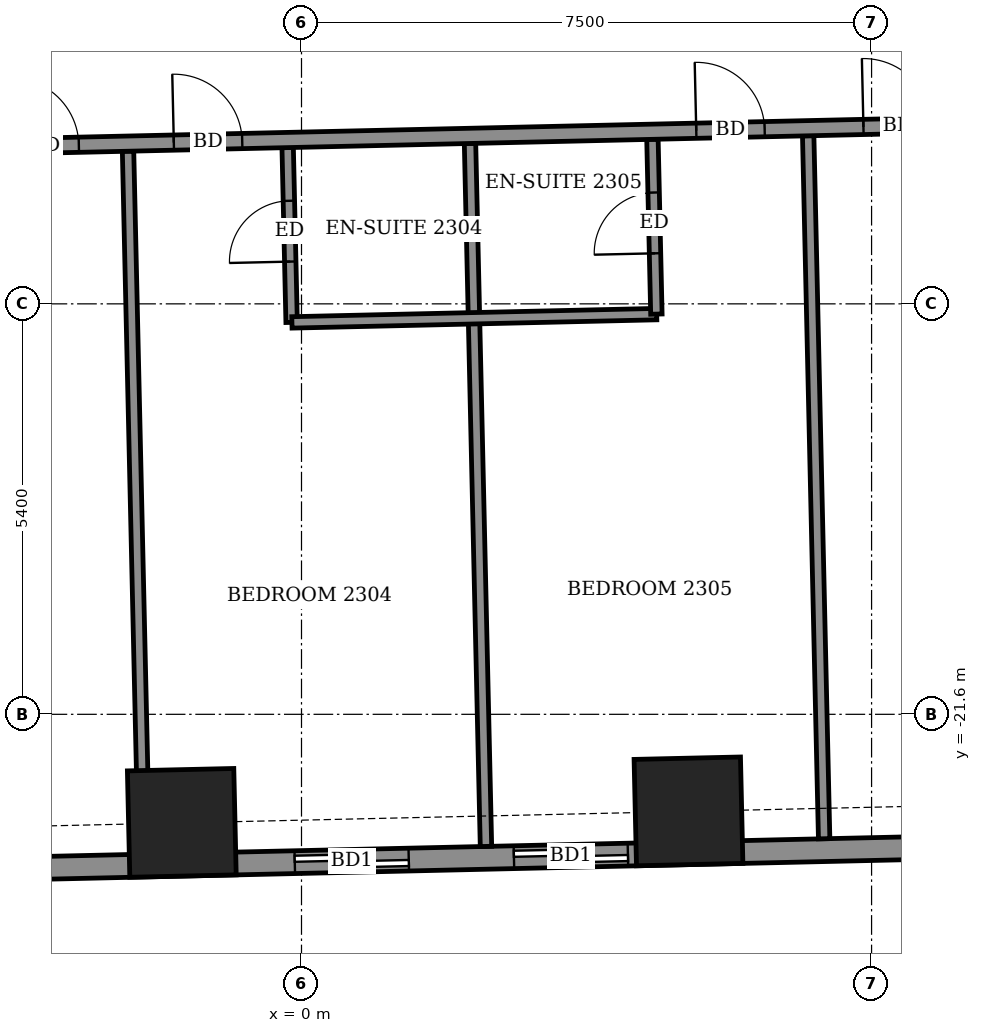
"""IFC4 building model, lengths in metres.
Left out: names, types, materials, properties, quantities, classifications, styles, units other than length and angle.
Written with IfcOpenShell. Run it as: python <this file> out.ifc"""

import sys

from ifc_helpers import new_model, si_unit, direction, frame, frame_2d, origin, origin_2d, place, context, subcontext, project, spatial, rectangle, extrude, element, fill, save


model = new_model("IFC4")
c1 = context("Model", 3, precision=1e-05, world=origin(), true_north=direction((0.0, 1.0)))
c2 = subcontext(c1, "Body", "Model", "MODEL_VIEW")
j1 = project(units=[si_unit("LENGTHUNIT", "METRE"), si_unit("PLANEANGLEUNIT", "RADIAN")], contexts=[c1])
p1 = place(None, origin())
s1 = spatial("IfcSite", under=j1, at=p1, CompositionType="ELEMENT")
p2 = place(p1, origin())
s2 = spatial("IfcBuilding", under=s1, at=p2, CompositionType="ELEMENT")
p3 = place(p2, frame((0.0, 0.0, 93.7)))
s3 = spatial("IfcBuildingStorey", under=s2, at=p3, CompositionType="ELEMENT", Elevation=93.7)
for number, where, z_axis, x_axis in (
    (1, (-1.575, -23.028, -0.55), (0.0, 0.0, 1.0), (1.0, 0.023, 0.0)),
    (2, (5.091, -22.877, -0.55), (0.0, 0.0, 1.0), (1.0, 0.023, 0.0)),
):
    element("IfcColumn", number, at=place(p3, frame(where, z_axis=z_axis, x_axis=x_axis)), inside=s3, PredefinedType="COLUMN", context=c2, shape_type="SweptSolid", body=[
        extrude(rectangle(XDim=1.4, YDim=1.4, at=origin_2d()), origin(), (0.0, 0.0, 1.0), 3.6),
    ])
p4 = place(p3, frame((-21.409, -24.029, 0.0), z_axis=(0.0, 0.0, 1.0), x_axis=(0.999742634032, 0.022686244721, 0.0)))
e3 = element("IfcWall", 3, at=p4, inside=s3, PredefinedType="SOLIDWALL", context=c2, shape_type="SweptSolid", body=[
    extrude(rectangle(XDim=46.372, YDim=0.3, at=frame_2d((23.186, 0.0))), origin(), (0.0, 0.0, 1.0), 3.05),
])
p5 = place(p4, frame((2.686, 0.0, 0.0)))
e4 = element("IfcOpeningElement", 4, at=p5, cuts=e3, PredefinedType="OPENING", context=c2, shape_type="SweptSolid", body=[
    extrude(rectangle(XDim=1.5, YDim=2.4, at=frame_2d((0.75, 1.2))), frame((0.0, 0.16, 0.0), z_axis=(0.0, -1.0, 0.0), x_axis=(1.0, 0.0, 0.0)), (0.0, 0.0, 1.0), 0.32),
])
p6 = place(p4, frame((7.959, 0.0, 0.0)))
e5 = element("IfcOpeningElement", 5, at=p6, cuts=e3, PredefinedType="OPENING", context=c2, shape_type="SweptSolid", body=[
    extrude(rectangle(XDim=1.5, YDim=2.4, at=frame_2d((0.75, 1.2))), frame((0.0, 0.16, 0.0), z_axis=(0.0, -1.0, 0.0), x_axis=(1.0, 0.0, 0.0)), (0.0, 0.0, 1.0), 0.32),
])
p7 = place(p4, frame((10.842, 0.0, 0.0)))
e6 = element("IfcOpeningElement", 6, at=p7, cuts=e3, PredefinedType="OPENING", context=c2, shape_type="SweptSolid", body=[
    extrude(rectangle(XDim=1.5, YDim=2.4, at=frame_2d((0.75, 1.2))), frame((0.0, 0.16, 0.0), z_axis=(0.0, -1.0, 0.0), x_axis=(1.0, 0.0, 0.0)), (0.0, 0.0, 1.0), 0.32),
])
p8 = place(p4, frame((16.3, 0.0, 0.0)))
e7 = element("IfcOpeningElement", 7, at=p8, cuts=e3, PredefinedType="OPENING", context=c2, shape_type="SweptSolid", body=[
    extrude(rectangle(XDim=1.5, YDim=2.4, at=frame_2d((0.75, 1.2))), frame((0.0, 0.16, 0.0), z_axis=(0.0, -1.0, 0.0), x_axis=(1.0, 0.0, 0.0)), (0.0, 0.0, 1.0), 0.32),
])
p9 = place(p4, frame((21.326, 0.0, 0.0)))
e8 = element("IfcOpeningElement", 8, at=p9, cuts=e3, PredefinedType="OPENING", context=c2, shape_type="SweptSolid", body=[
    extrude(rectangle(XDim=1.5, YDim=2.4, at=frame_2d((0.75, 1.2))), frame((0.0, 0.16, 0.0), z_axis=(0.0, -1.0, 0.0), x_axis=(1.0, 0.0, 0.0)), (0.0, 0.0, 1.0), 0.32),
])
p10 = place(p4, frame((24.21, 0.0, 0.0)))
e9 = element("IfcOpeningElement", 9, at=p10, cuts=e3, PredefinedType="OPENING", context=c2, shape_type="SweptSolid", body=[
    extrude(rectangle(XDim=1.5, YDim=2.4, at=frame_2d((0.75, 1.2))), frame((0.0, 0.16, 0.0), z_axis=(0.0, -1.0, 0.0), x_axis=(1.0, 0.0, 0.0)), (0.0, 0.0, 1.0), 0.32),
])
p11 = place(p4, frame((29.769, 0.0, 0.0)))
e10 = element("IfcOpeningElement", 10, at=p11, cuts=e3, PredefinedType="OPENING", context=c2, shape_type="SweptSolid", body=[
    extrude(rectangle(XDim=1.5, YDim=2.4, at=frame_2d((0.75, 1.2))), frame((0.0, 0.16, 0.0), z_axis=(0.0, -1.0, 0.0), x_axis=(1.0, 0.0, 0.0)), (0.0, 0.0, 1.0), 0.32),
])
p12 = place(p4, frame((34.819, 0.0, 0.0)))
e11 = element("IfcOpeningElement", 11, at=p12, cuts=e3, PredefinedType="OPENING", context=c2, shape_type="SweptSolid", body=[
    extrude(rectangle(XDim=1.5, YDim=2.4, at=frame_2d((0.75, 1.2))), frame((0.0, 0.16, 0.0), z_axis=(0.0, -1.0, 0.0), x_axis=(1.0, 0.0, 0.0)), (0.0, 0.0, 1.0), 0.32),
])
p13 = place(p4, frame((37.852, 0.0, 0.0)))
e12 = element("IfcOpeningElement", 12, at=p13, cuts=e3, PredefinedType="OPENING", context=c2, shape_type="SweptSolid", body=[
    extrude(rectangle(XDim=1.2, YDim=2.4, at=frame_2d((0.6, 1.2))), frame((0.0, 0.16, 0.0), z_axis=(0.0, -1.0, 0.0), x_axis=(1.0, 0.0, 0.0)), (0.0, 0.0, 1.0), 0.32),
])
p14 = place(p4, frame((42.373, 0.0, 0.9)))
e13 = element("IfcOpeningElement", 13, at=p14, cuts=e3, PredefinedType="OPENING", context=c2, shape_type="SweptSolid", body=[
    extrude(rectangle(XDim=2.4, YDim=1.5, at=frame_2d((1.2, 0.75))), frame((0.0, 0.16, 0.0), z_axis=(0.0, -1.0, 0.0), x_axis=(1.0, 0.0, 0.0)), (0.0, 0.0, 1.0), 0.32),
])
p15 = place(p3, frame((-2.072, -23.44, 0.0), z_axis=(0.0, 0.0, 1.0), x_axis=(-0.022697424684, 0.999742380272, 0.0)))
e14 = element("IfcWall", 14, at=p15, inside=s3, PredefinedType="PARTITIONING", context=c2, shape_type="SweptSolid", body=[
    extrude(rectangle(XDim=9.25, YDim=0.15, at=frame_2d((4.625, 0.0))), origin(), (0.0, 0.0, 1.0), 3.05),
])
p16 = place(p3, frame((2.427, -23.338, 0.0), z_axis=(0.0, 0.0, 1.0), x_axis=(-0.022698023584, 0.999742366675, 0.0)))
e15 = element("IfcWall", 15, at=p16, inside=s3, PredefinedType="PARTITIONING", context=c2, shape_type="SweptSolid", body=[
    extrude(rectangle(XDim=9.25, YDim=0.15, at=frame_2d((4.625, 0.0))), origin(), (0.0, 0.0, 1.0), 2.55),
])
p17 = place(p3, frame((6.876, -23.237, 0.0), z_axis=(0.0, 0.0, 1.0), x_axis=(-0.022697424684, 0.999742380272, 0.0)))
e16 = element("IfcWall", 16, at=p17, inside=s3, PredefinedType="PARTITIONING", context=c2, shape_type="SweptSolid", body=[
    extrude(rectangle(XDim=9.25, YDim=0.15, at=frame_2d((4.625, 0.0))), origin(), (0.0, 0.0, 1.0), 2.55),
])
p18 = place(p3, frame((-0.13, -16.444, 0.0), z_axis=(0.0, 0.0, 1.0), x_axis=(-0.022603288534, 0.999744513037, 0.0)))
e17 = element("IfcWall", 17, at=p18, inside=s3, PredefinedType="PARTITIONING", context=c2, shape_type="SweptSolid", body=[
    extrude(rectangle(XDim=2.301, YDim=0.15, at=frame_2d((1.15, 0.0))), origin(), (0.0, 0.0, 1.0), 3.05),
])
p19 = place(p18, frame((0.8, 0.0, 0.0)))
e18 = element("IfcOpeningElement", 18, at=p19, cuts=e17, PredefinedType="OPENING", context=c2, shape_type="SweptSolid", body=[
    extrude(rectangle(XDim=0.8, YDim=2.1, at=frame_2d((0.4, 1.05))), frame((0.0, 0.085, 0.0), z_axis=(0.0, -1.0, 0.0), x_axis=(1.0, 0.0, 0.0)), (0.0, 0.0, 1.0), 0.17),
])
p20 = place(p3, frame((-0.126, -16.444, 0.0), z_axis=(0.0, 0.0, 1.0), x_axis=(0.99974154664, 0.022734113616, 0.0)))
e19 = element("IfcWall", 19, at=p20, inside=s3, PredefinedType="PARTITIONING", context=c2, shape_type="SweptSolid", body=[
    extrude(rectangle(XDim=4.8, YDim=0.15, at=frame_2d((2.4, 0.0))), origin(), (0.0, 0.0, 1.0), 3.05),
])
p21 = place(p3, frame((4.669, -16.335, 0.0), z_axis=(0.0, 0.0, 1.0), x_axis=(-0.022612884682, 0.999744296031, 0.0)))
e20 = element("IfcWall", 20, at=p21, inside=s3, PredefinedType="PARTITIONING", context=c2, shape_type="SweptSolid", body=[
    extrude(rectangle(XDim=2.3, YDim=0.15, at=frame_2d((1.15, 0.0))), origin(), (0.0, 0.0, 1.0), 3.05),
])
p22 = place(p21, frame((0.8, 0.0, 0.0)))
e21 = element("IfcOpeningElement", 21, at=p22, cuts=e20, PredefinedType="OPENING", context=c2, shape_type="SweptSolid", body=[
    extrude(rectangle(XDim=0.8, YDim=2.1, at=frame_2d((0.4, 1.05))), frame((0.0, 0.085, 0.0), z_axis=(0.0, -1.0, 0.0), x_axis=(1.0, 0.0, 0.0)), (0.0, 0.0, 1.0), 0.17),
])
p23 = place(p3, frame((-24.274, -14.591, 0.0), z_axis=(0.0, 0.0, 1.0), x_axis=(0.999742718753, 0.022682510909, 0.0)))
e22 = element("IfcWall", 22, at=p23, inside=s3, PredefinedType="PARTITIONING", context=c2, shape_type="SweptSolid", body=[
    extrude(rectangle(XDim=52.471, YDim=0.2, at=frame_2d((26.236, 0.0))), origin(), (0.0, 0.0, 1.0), 3.05),
])
p24 = place(p23, frame((1.525, 0.0, 0.0)))
e23 = element("IfcOpeningElement", 23, at=p24, cuts=e22, PredefinedType="OPENING", context=c2, shape_type="SweptSolid", body=[
    extrude(rectangle(XDim=1.0, YDim=2.1, at=frame_2d((0.5, 1.05))), frame((0.0, 0.11, 0.0), z_axis=(0.0, -1.0, 0.0), x_axis=(1.0, 0.0, 0.0)), (0.0, 0.0, 1.0), 0.22),
])
p25 = place(p23, frame((6.9, 0.0, 0.0)))
e24 = element("IfcOpeningElement", 24, at=p25, cuts=e22, PredefinedType="OPENING", context=c2, shape_type="SweptSolid", body=[
    extrude(rectangle(XDim=0.9, YDim=2.1, at=frame_2d((0.45, 1.05))), frame((0.0, 0.11, 0.0), z_axis=(0.0, -1.0, 0.0), x_axis=(1.0, 0.0, 0.0)), (0.0, 0.0, 1.0), 0.22),
])
p26 = place(p23, frame((11.575, 0.0, 0.0)))
e25 = element("IfcOpeningElement", 25, at=p26, cuts=e22, PredefinedType="OPENING", context=c2, shape_type="SweptSolid", body=[
    extrude(rectangle(XDim=0.9, YDim=2.1, at=frame_2d((0.45, 1.05))), frame((0.0, 0.11, 0.0), z_axis=(0.0, -1.0, 0.0), x_axis=(1.0, 0.0, 0.0)), (0.0, 0.0, 1.0), 0.22),
])
p27 = place(p23, frame((13.6, 0.0, 0.0)))
e26 = element("IfcOpeningElement", 26, at=p27, cuts=e22, PredefinedType="OPENING", context=c2, shape_type="SweptSolid", body=[
    extrude(rectangle(XDim=0.9, YDim=2.1, at=frame_2d((0.45, 1.05))), frame((0.0, 0.11, 0.0), z_axis=(0.0, -1.0, 0.0), x_axis=(1.0, 0.0, 0.0)), (0.0, 0.0, 1.0), 0.22),
])
p28 = place(p23, frame((20.45, 0.0, 0.0)))
e27 = element("IfcOpeningElement", 27, at=p28, cuts=e22, PredefinedType="OPENING", context=c2, shape_type="SweptSolid", body=[
    extrude(rectangle(XDim=0.9, YDim=2.1, at=frame_2d((0.45, 1.05))), frame((0.0, 0.11, 0.0), z_axis=(0.0, -1.0, 0.0), x_axis=(1.0, 0.0, 0.0)), (0.0, 0.0, 1.0), 0.22),
])
p29 = place(p23, frame((22.6, 0.0, 0.0)))
e28 = element("IfcOpeningElement", 28, at=p29, cuts=e22, PredefinedType="OPENING", context=c2, shape_type="SweptSolid", body=[
    extrude(rectangle(XDim=0.9, YDim=2.1, at=frame_2d((0.45, 1.05))), frame((0.0, 0.11, 0.0), z_axis=(0.0, -1.0, 0.0), x_axis=(1.0, 0.0, 0.0)), (0.0, 0.0, 1.0), 0.22),
])
p30 = place(p23, frame((29.475, 0.0, 0.0)))
e29 = element("IfcOpeningElement", 29, at=p30, cuts=e22, PredefinedType="OPENING", context=c2, shape_type="SweptSolid", body=[
    extrude(rectangle(XDim=0.9, YDim=2.1, at=frame_2d((0.45, 1.05))), frame((0.0, 0.11, 0.0), z_axis=(0.0, -1.0, 0.0), x_axis=(1.0, 0.0, 0.0)), (0.0, 0.0, 1.0), 0.22),
])
p31 = place(p23, frame((31.675, 0.0, 0.0)))
e30 = element("IfcOpeningElement", 30, at=p31, cuts=e22, PredefinedType="OPENING", context=c2, shape_type="SweptSolid", body=[
    extrude(rectangle(XDim=0.9, YDim=2.1, at=frame_2d((0.45, 1.05))), frame((0.0, 0.11, 0.0), z_axis=(0.0, -1.0, 0.0), x_axis=(1.0, 0.0, 0.0)), (0.0, 0.0, 1.0), 0.22),
])
p32 = place(p23, frame((38.675, 0.0, 0.0)))
e31 = element("IfcOpeningElement", 31, at=p32, cuts=e22, PredefinedType="OPENING", context=c2, shape_type="SweptSolid", body=[
    extrude(rectangle(XDim=0.9, YDim=2.1, at=frame_2d((0.45, 1.05))), frame((0.0, 0.11, 0.0), z_axis=(0.0, -1.0, 0.0), x_axis=(1.0, 0.0, 0.0)), (0.0, 0.0, 1.0), 0.22),
])
p33 = place(p23, frame((40.675, 0.0, 0.0)))
e32 = element("IfcOpeningElement", 32, at=p33, cuts=e22, PredefinedType="OPENING", context=c2, shape_type="SweptSolid", body=[
    extrude(rectangle(XDim=0.9, YDim=2.1, at=frame_2d((0.45, 1.05))), frame((0.0, 0.11, 0.0), z_axis=(0.0, -1.0, 0.0), x_axis=(1.0, 0.0, 0.0)), (0.0, 0.0, 1.0), 0.22),
])
p34 = place(p23, frame((50.436, 0.0, 0.0)))
e33 = element("IfcOpeningElement", 33, at=p34, cuts=e22, PredefinedType="OPENING", context=c2, shape_type="SweptSolid", body=[
    extrude(rectangle(XDim=1.0, YDim=2.1, at=frame_2d((0.5, 1.05))), frame((0.0, 0.11, 0.0), z_axis=(0.0, -1.0, 0.0), x_axis=(1.0, 0.0, 0.0)), (0.0, 0.0, 1.0), 0.22),
])
p35 = place(p23, frame((45.45, 0.0, 0.0)))
e34 = element("IfcOpeningElement", 34, at=p35, cuts=e22, PredefinedType="OPENING", context=c2, shape_type="SweptSolid", body=[
    extrude(rectangle(XDim=0.9, YDim=2.1, at=frame_2d((0.45, 1.05))), frame((0.0, 0.11, 0.0), z_axis=(0.0, -1.0, 0.0), x_axis=(1.0, 0.0, 0.0)), (0.0, 0.0, 1.0), 0.22),
])
p36 = place(p9, origin())
e35 = element("IfcDoor", 35, at=p36, inside=s3, OperationType="SLIDING_TO_LEFT", PredefinedType="DOOR", context=c2, shape_type="SweptSolid", body=[
    extrude(rectangle(XDim=1.5, YDim=2.4, at=frame_2d((0.75, 1.2))), frame((0.0, 0.025, 0.0), z_axis=(0.0, -1.0, 0.0), x_axis=(1.0, 0.0, 0.0)), (0.0, 0.0, 1.0), 0.05),
])
fill(e8, e35)
p37 = place(p10, origin())
e36 = element("IfcDoor", 36, at=p37, inside=s3, OperationType="SLIDING_TO_LEFT", PredefinedType="DOOR", context=c2, shape_type="SweptSolid", body=[
    extrude(rectangle(XDim=1.5, YDim=2.4, at=frame_2d((0.75, 1.2))), frame((0.0, 0.025, 0.0), z_axis=(0.0, -1.0, 0.0), x_axis=(1.0, 0.0, 0.0)), (0.0, 0.0, 1.0), 0.05),
])
fill(e9, e36)
p38 = place(p28, origin())
e37 = element("IfcDoor", 37, at=p38, inside=s3, OperationType="SINGLE_SWING_LEFT", PredefinedType="DOOR", context=c2, shape_type="SweptSolid", body=[
    extrude(rectangle(XDim=0.9, YDim=2.1, at=frame_2d((0.45, 1.05))), frame((0.0, 0.025, 0.0), z_axis=(0.0, -1.0, 0.0), x_axis=(1.0, 0.0, 0.0)), (0.0, 0.0, 1.0), 0.05),
])
fill(e27, e37)
p39 = place(p29, origin())
e38 = element("IfcDoor", 38, at=p39, inside=s3, OperationType="SINGLE_SWING_RIGHT", PredefinedType="DOOR", context=c2, shape_type="SweptSolid", body=[
    extrude(rectangle(XDim=0.9, YDim=2.1, at=frame_2d((0.45, 1.05))), frame((0.0, 0.025, 0.0), z_axis=(0.0, -1.0, 0.0), x_axis=(1.0, 0.0, 0.0)), (0.0, 0.0, 1.0), 0.05),
])
fill(e28, e38)
p40 = place(p19, origin())
e39 = element("IfcDoor", 39, at=p40, inside=s3, OperationType="SINGLE_SWING_RIGHT", PredefinedType="DOOR", context=c2, shape_type="SweptSolid", body=[
    extrude(rectangle(XDim=0.8, YDim=2.1, at=frame_2d((0.4, 1.05))), frame((0.0, 0.025, 0.0), z_axis=(0.0, -1.0, 0.0), x_axis=(1.0, 0.0, 0.0)), (0.0, 0.0, 1.0), 0.05),
])
fill(e18, e39)
p41 = place(p30, origin())
e40 = element("IfcDoor", 40, at=p41, inside=s3, OperationType="SINGLE_SWING_LEFT", PredefinedType="DOOR", context=c2, shape_type="SweptSolid", body=[
    extrude(rectangle(XDim=0.9, YDim=2.1, at=frame_2d((0.45, 1.05))), frame((0.0, 0.025, 0.0), z_axis=(0.0, -1.0, 0.0), x_axis=(1.0, 0.0, 0.0)), (0.0, 0.0, 1.0), 0.05),
])
fill(e29, e40)
p42 = place(p22, origin())
e41 = element("IfcDoor", 41, at=p42, inside=s3, OperationType="SINGLE_SWING_LEFT", PredefinedType="DOOR", context=c2, shape_type="SweptSolid", body=[
    extrude(rectangle(XDim=0.8, YDim=2.1, at=frame_2d((0.4, 1.05))), frame((0.0, 0.025, 0.0), z_axis=(0.0, -1.0, 0.0), x_axis=(1.0, 0.0, 0.0)), (0.0, 0.0, 1.0), 0.05),
])
fill(e21, e41)
p43 = place(p31, origin())
e42 = element("IfcDoor", 42, at=p43, inside=s3, OperationType="SINGLE_SWING_RIGHT", PredefinedType="DOOR", context=c2, shape_type="SweptSolid", body=[
    extrude(rectangle(XDim=0.9, YDim=2.1, at=frame_2d((0.45, 1.05))), frame((0.0, 0.025, 0.0), z_axis=(0.0, -1.0, 0.0), x_axis=(1.0, 0.0, 0.0)), (0.0, 0.0, 1.0), 0.05),
])
fill(e30, e42)
save(model, sys.argv[1])
